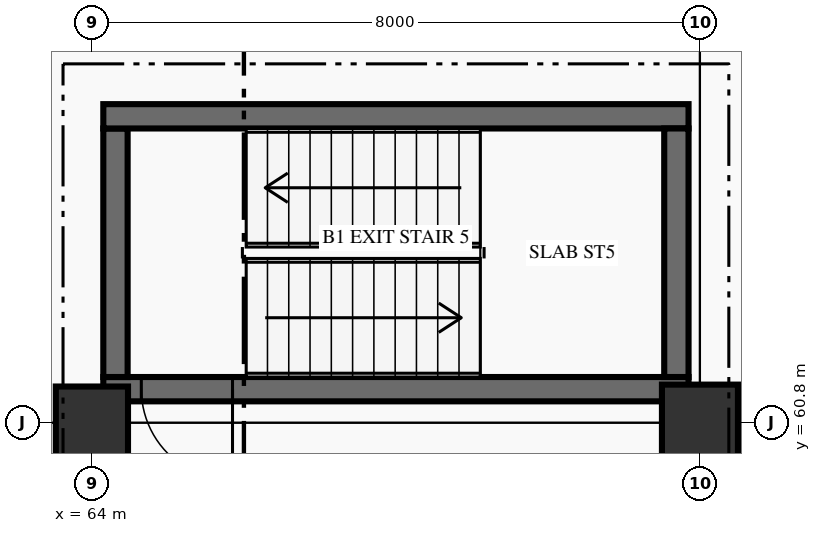
"""IFC4 building model, lengths in metres.
Left out: names, types, materials, properties, quantities, classifications, styles, units other than length and angle.
Written with IfcOpenShell. Run it as: python <this file> out.ifc"""

import sys

from ifc_helpers import new_model, si_unit, direction, frame, frame_2d, origin, origin_2d, place, context, subcontext, project, spatial, rectangle, extrude, element, fill, save


model = new_model("IFC4")
c1 = context("Model", 3, precision=1e-05, world=origin(), true_north=direction((0.0, 1.0)))
c2 = subcontext(c1, "Body", "Model", "MODEL_VIEW")
j1 = project(units=[si_unit("LENGTHUNIT", "METRE"), si_unit("PLANEANGLEUNIT", "RADIAN")], contexts=[c1])
p1 = place(None, origin())
s1 = spatial("IfcSite", under=j1, at=p1, CompositionType="ELEMENT")
p2 = place(p1, origin())
s2 = spatial("IfcBuilding", under=s1, at=p2, CompositionType="ELEMENT")
p3 = place(p2, frame((0.0, 0.0, -4.5)))
s3 = spatial("IfcBuildingStorey", under=s2, at=p3, CompositionType="ELEMENT", Elevation=-4.5)
p4 = place(p3, frame((64.0, 60.8, 0.0), z_axis=(0.0, 0.0, 1.0), x_axis=(1.0, 0.0, 0.0)))
e1 = element("IfcColumn", 1, at=p4, inside=s3, PredefinedType="COLUMN", context=c2, shape_type="SweptSolid", body=[
    extrude(rectangle(XDim=0.95, YDim=0.95, at=origin_2d()), origin(), (0.0, 0.0, 1.0), 4.5),
])
p5 = place(p3, frame((72.0, 60.8, 0.0), z_axis=(0.0, 0.0, 1.0), x_axis=(1.0, 0.0, 0.0)))
e2 = element("IfcColumn", 2, at=p5, inside=s3, PredefinedType="COLUMN", context=c2, shape_type="SweptSolid", body=[
    extrude(rectangle(XDim=1.0, YDim=1.0, at=origin_2d()), origin(), (0.0, 0.0, 1.0), 4.5),
])
p6 = place(p3, frame((71.85, 61.24, 0.0), z_axis=(0.0, 0.0, 1.0), x_axis=(-1.0, 0.0, 0.0)))
e3 = element("IfcWall", 3, at=p6, inside=s3, PredefinedType="SHEAR", context=c2, shape_type="SweptSolid", body=[
    extrude(rectangle(XDim=7.7, YDim=0.32, at=frame_2d((3.85, 0.0))), origin(), (0.0, 0.0, 1.0), 4.5),
])
p7 = place(p6, frame((6.0, 0.0, 0.0)))
e4 = element("IfcOpeningElement", 4, at=p7, cuts=e3, PredefinedType="OPENING", context=c2, shape_type="SweptSolid", body=[
    extrude(rectangle(XDim=1.2, YDim=2.2, at=frame_2d((0.6, 1.1))), frame((0.0, 0.17, 0.0), z_axis=(0.0, -1.0, 0.0), x_axis=(1.0, 0.0, 0.0)), (0.0, 0.0, 1.0), 0.34),
])
p8 = place(p3, frame((64.31, 61.4, 0.0), z_axis=(0.0, 0.0, 1.0), x_axis=(0.0, 1.0, 0.0)))
e5 = element("IfcWall", 5, at=p8, inside=s3, PredefinedType="SHEAR", context=c2, shape_type="SweptSolid", body=[
    extrude(rectangle(XDim=3.27, YDim=0.32, at=frame_2d((1.635, 0.0))), origin(), (0.0, 0.0, 1.0), 4.5),
])
p9 = place(p3, frame((64.15, 64.83, 0.0), z_axis=(0.0, 0.0, 1.0), x_axis=(1.0, 0.0, 0.0)))
e6 = element("IfcWall", 6, at=p9, inside=s3, PredefinedType="SHEAR", context=c2, shape_type="SweptSolid", body=[
    extrude(rectangle(XDim=7.7, YDim=0.32, at=frame_2d((3.85, 0.0))), origin(), (0.0, 0.0, 1.0), 4.5),
])
p10 = place(p3, frame((71.69, 64.67, 0.0), z_axis=(0.0, 0.0, 1.0), x_axis=(0.0, -1.0, 0.0)))
e7 = element("IfcWall", 7, at=p10, inside=s3, PredefinedType="SHEAR", context=c2, shape_type="SweptSolid", body=[
    extrude(rectangle(XDim=3.27, YDim=0.32, at=frame_2d((1.635, 0.0))), origin(), (0.0, 0.0, 1.0), 4.5),
])
p11 = place(p7, origin())
e8 = element("IfcDoor", 8, at=p11, inside=s3, OperationType="SINGLE_SWING_LEFT", PredefinedType="DOOR", context=c2, shape_type="SweptSolid", body=[
    extrude(rectangle(XDim=1.2, YDim=2.2, at=frame_2d((0.6, 1.1))), frame((0.0, 0.025, 0.0), z_axis=(0.0, -1.0, 0.0), x_axis=(1.0, 0.0, 0.0)), (0.0, 0.0, 1.0), 0.05),
])
fill(e4, e8)
save(model, sys.argv[1])
